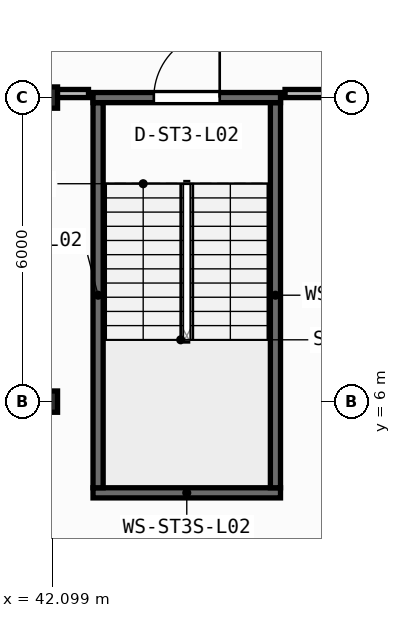
"""IFC4 building model, lengths in metres.
Left out: names, types, materials, properties, quantities, classifications, styles, units other than length and angle.
Written with IfcOpenShell. Run it as: python <this file> out.ifc"""

import sys

from ifc_helpers import new_model, si_unit, direction, frame, frame_2d, origin, origin_2d, place, context, subcontext, project, spatial, rectangle, i_section, extrude, element, fill, save


model = new_model("IFC4")
c1 = context("Model", 3, precision=1e-05, world=origin(), true_north=direction((0.0, 1.0)))
c2 = subcontext(c1, "Body", "Model", "MODEL_VIEW")
j1 = project(units=[si_unit("LENGTHUNIT", "METRE"), si_unit("PLANEANGLEUNIT", "RADIAN")], contexts=[c1])
p1 = place(None, origin())
s1 = spatial("IfcSite", under=j1, at=p1, CompositionType="ELEMENT")
p2 = place(p1, origin())
s2 = spatial("IfcBuilding", under=s1, at=p2, CompositionType="ELEMENT")
p3 = place(p2, frame((0.0, 0.0, 9.0)))
s3 = spatial("IfcBuildingStorey", under=s2, at=p3, CompositionType="ELEMENT", Elevation=9.0)
for number, where, z_axis, x_axis in (
    (1, (42.0, 6.0, 0.0), (0.0, 0.0, 1.0), (1.0, 0.0, 0.0)),
    (2, (42.0, 12.0, 0.0), (0.0, 0.0, 1.0), (1.0, 0.0, 0.0)),
):
    element("IfcColumn", number, at=place(p3, frame(where, z_axis=z_axis, x_axis=x_axis)), inside=s3, PredefinedType="COLUMN", context=c2, shape_type="SweptSolid", body=[
        extrude(i_section(OverallWidth=0.4, OverallDepth=0.42, WebThickness=0.025, FlangeThickness=0.04, at=origin_2d()), origin(), (0.0, 0.0, 1.0), 4.5),
    ])
p4 = place(p3, frame((42.9, 4.2, 0.0), z_axis=(0.0, 0.0, 1.0), x_axis=(1.0, 0.0, 0.0)))
e3 = element("IfcWall", 3, at=p4, inside=s3, PredefinedType="SHEAR", context=c2, shape_type="SweptSolid", body=[
    extrude(rectangle(XDim=3.7, YDim=0.2, at=frame_2d((1.85, 0.0))), origin(), (0.0, 0.0, 1.0), 4.25),
])
for number, where, z_axis, x_axis in (
    (4, (43.0, 4.3, 0.0), (0.0, 0.0, 1.0), (0.0, 1.0, 0.0)),
    (5, (46.5, 4.3, 0.0), (0.0, 0.0, 1.0), (0.0, 1.0, 0.0)),
):
    element("IfcWall", number, at=place(p3, frame(where, z_axis=z_axis, x_axis=x_axis)), inside=s3, PredefinedType="SHEAR", context=c2, shape_type="SweptSolid", body=[
        extrude(rectangle(XDim=7.6, YDim=0.2, at=frame_2d((3.8, 0.0))), origin(), (0.0, 0.0, 1.0), 4.25),
    ])
p5 = place(p3, frame((42.9, 12.0, 0.0), z_axis=(0.0, 0.0, 1.0), x_axis=(1.0, 0.0, 0.0)))
e6 = element("IfcWall", 6, at=p5, inside=s3, PredefinedType="SHEAR", context=c2, shape_type="SweptSolid", body=[
    extrude(rectangle(XDim=3.7, YDim=0.2, at=frame_2d((1.85, 0.0))), origin(), (0.0, 0.0, 1.0), 4.25),
])
p6 = place(p5, frame((1.2, 0.0, 0.0)))
e7 = element("IfcOpeningElement", 7, at=p6, cuts=e6, PredefinedType="OPENING", context=c2, shape_type="SweptSolid", body=[
    extrude(rectangle(XDim=1.3, YDim=2.15, at=frame_2d((0.65, 1.075))), frame((0.0, 0.11, 0.0), z_axis=(0.0, -1.0, 0.0), x_axis=(1.0, 0.0, 0.0)), (0.0, 0.0, 1.0), 0.22),
])
p7 = place(p3, frame((31.63, 12.08, 0.0), z_axis=(0.0, 0.0, 1.0), x_axis=(1.0, 0.0, 0.0)))
e8 = element("IfcWall", 8, at=p7, inside=s3, PredefinedType="PARTITIONING", context=c2, shape_type="SweptSolid", body=[
    extrude(rectangle(XDim=11.181, YDim=0.16, at=frame_2d((5.59, 0.0))), origin(), (0.0, 0.0, 1.0), 3.425),
])
p8 = place(p3, frame((46.689, 12.08, 0.0), z_axis=(0.0, 0.0, 1.0), x_axis=(1.0, 0.0, 0.0)))
e9 = element("IfcWall", 9, at=p8, inside=s3, PredefinedType="PARTITIONING", context=c2, shape_type="SweptSolid", body=[
    extrude(rectangle(XDim=2.843, YDim=0.16, at=frame_2d((1.421, 0.0))), origin(), (0.0, 0.0, 1.0), 3.425),
])
p9 = place(p6, origin())
e10 = element("IfcDoor", 10, at=p9, inside=s3, OperationType="SINGLE_SWING_RIGHT", PredefinedType="DOOR", context=c2, shape_type="SweptSolid", body=[
    extrude(rectangle(XDim=1.3, YDim=2.15, at=frame_2d((0.65, 1.075))), frame((0.0, 0.025, 0.0), z_axis=(0.0, -1.0, 0.0), x_axis=(1.0, 0.0, 0.0)), (0.0, 0.0, 1.0), 0.05),
])
fill(e7, e10)
save(model, sys.argv[1])
